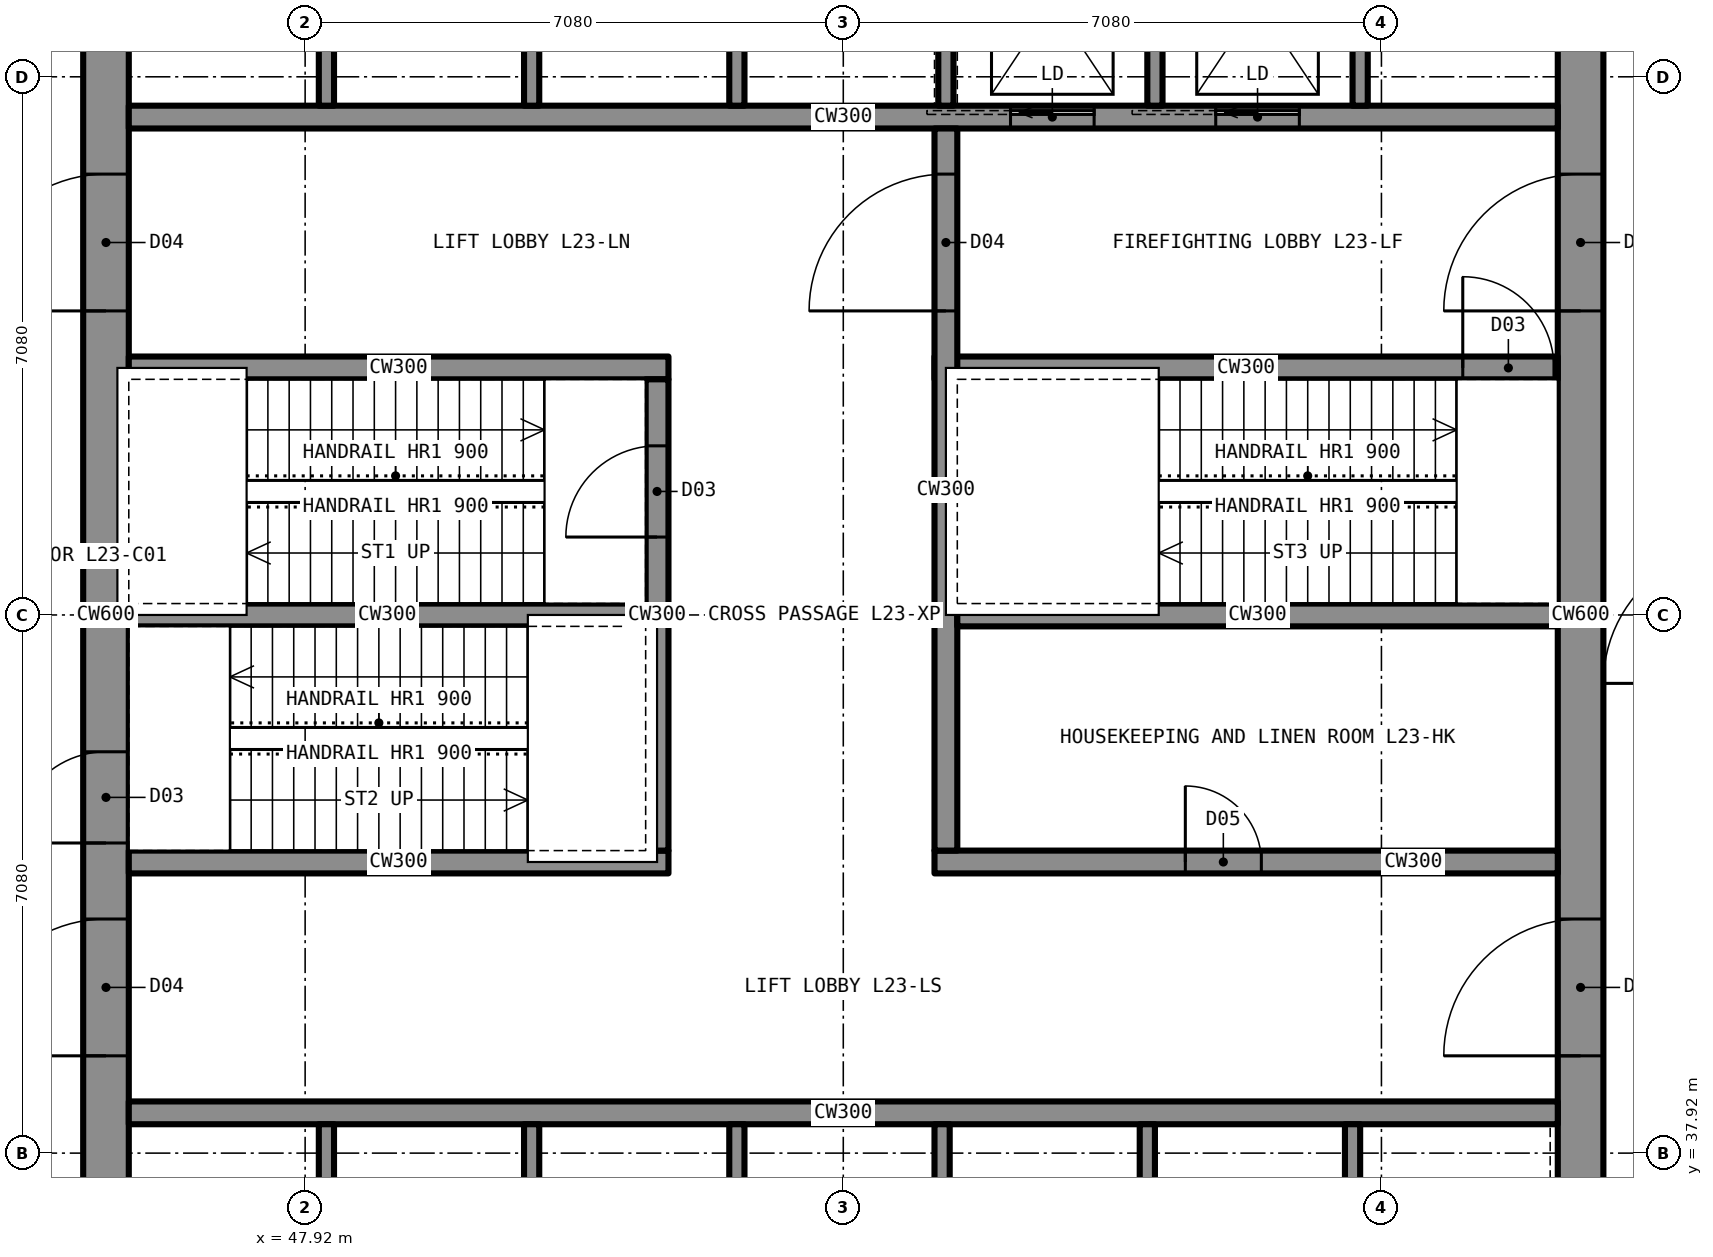
"""IFC4 building model, lengths in metres.
Left out: names, types, materials, properties, quantities, classifications, styles, units other than length and angle.
Written with IfcOpenShell. Run it as: python <this file> out.ifc"""

import sys

from ifc_helpers import new_model, si_unit, direction, frame, frame_2d, origin, place, context, subcontext, project, spatial, rectangle, extrude, element, fill, save


model = new_model("IFC4")
c1 = context("Model", 3, precision=1e-05, world=origin(), true_north=direction((0.0, 1.0)))
c2 = subcontext(c1, "Body", "Model", "MODEL_VIEW")
j1 = project(units=[si_unit("LENGTHUNIT", "METRE"), si_unit("PLANEANGLEUNIT", "RADIAN")], contexts=[c1])
p1 = place(None, origin())
s1 = spatial("IfcSite", under=j1, at=p1, CompositionType="ELEMENT")
p2 = place(p1, origin())
s2 = spatial("IfcBuilding", under=s1, at=p2, CompositionType="ELEMENT")
p3 = place(p2, frame((0.0, 0.0, 88.0)))
s3 = spatial("IfcBuildingStorey", under=s2, at=p3, CompositionType="ELEMENT", Elevation=88.0)
p4 = place(p3, frame((64.7, 35.6, 0.0), z_axis=(0.0, 0.0, 1.0), x_axis=(0.0, 1.0, 0.0)))
e1 = element("IfcWall", 1, at=p4, inside=s3, PredefinedType="SHEAR", context=c2, shape_type="SweptSolid", body=[
    extrude(rectangle(XDim=18.8, YDim=0.6, at=frame_2d((9.4, 0.0))), origin(), (0.0, 0.0, 1.0), 5.4),
])
p5 = place(p4, frame((13.4, 0.0, 0.0)))
e2 = element("IfcOpeningElement", 2, at=p5, cuts=e1, PredefinedType="OPENING", context=c2, shape_type="SweptSolid", body=[
    extrude(rectangle(XDim=1.8, YDim=2.2, at=frame_2d((0.9, 1.1))), frame((0.0, 0.31, 0.0), z_axis=(0.0, -1.0, 0.0), x_axis=(1.0, 0.0, 0.0)), (0.0, 0.0, 1.0), 0.62),
])
p6 = place(p4, frame((3.6, 0.0, 0.0)))
e3 = element("IfcOpeningElement", 3, at=p6, cuts=e1, PredefinedType="OPENING", context=c2, shape_type="SweptSolid", body=[
    extrude(rectangle(XDim=1.8, YDim=2.2, at=frame_2d((0.9, 1.1))), frame((0.0, 0.31, 0.0), z_axis=(0.0, -1.0, 0.0), x_axis=(1.0, 0.0, 0.0)), (0.0, 0.0, 1.0), 0.62),
])
p7 = place(p3, frame((45.3, 35.6, 0.0), z_axis=(0.0, 0.0, 1.0), x_axis=(0.0, 1.0, 0.0)))
e4 = element("IfcWall", 4, at=p7, inside=s3, PredefinedType="SHEAR", context=c2, shape_type="SweptSolid", body=[
    extrude(rectangle(XDim=18.8, YDim=0.6, at=frame_2d((9.4, 0.0))), origin(), (0.0, 0.0, 1.0), 5.4),
])
p8 = place(p7, frame((13.4, 0.0, 0.0)))
e5 = element("IfcOpeningElement", 5, at=p8, cuts=e4, PredefinedType="OPENING", context=c2, shape_type="SweptSolid", body=[
    extrude(rectangle(XDim=1.8, YDim=2.2, at=frame_2d((0.9, 1.1))), frame((0.0, 0.31, 0.0), z_axis=(0.0, -1.0, 0.0), x_axis=(1.0, 0.0, 0.0)), (0.0, 0.0, 1.0), 0.62),
])
p9 = place(p7, frame((3.6, 0.0, 0.0)))
e6 = element("IfcOpeningElement", 6, at=p9, cuts=e4, PredefinedType="OPENING", context=c2, shape_type="SweptSolid", body=[
    extrude(rectangle(XDim=1.8, YDim=2.2, at=frame_2d((0.9, 1.1))), frame((0.0, 0.31, 0.0), z_axis=(0.0, -1.0, 0.0), x_axis=(1.0, 0.0, 0.0)), (0.0, 0.0, 1.0), 0.62),
])
p10 = place(p7, frame((6.4, 0.0, 0.0)))
e7 = element("IfcOpeningElement", 7, at=p10, cuts=e4, PredefinedType="OPENING", context=c2, shape_type="SweptSolid", body=[
    extrude(rectangle(XDim=1.2, YDim=2.2, at=frame_2d((0.6, 1.1))), frame((0.0, 0.31, 0.0), z_axis=(0.0, -1.0, 0.0), x_axis=(1.0, 0.0, 0.0)), (0.0, 0.0, 1.0), 0.62),
])
p11 = place(p3, frame((45.6, 51.55, 0.0), z_axis=(0.0, 0.0, 1.0), x_axis=(1.0, 0.0, 0.0)))
e8 = element("IfcWall", 8, at=p11, inside=s3, PredefinedType="SHEAR", context=c2, shape_type="SweptSolid", body=[
    extrude(rectangle(XDim=18.8, YDim=0.3, at=frame_2d((9.4, 0.0))), origin(), (0.0, 0.0, 1.0), 5.4),
])
p12 = place(p11, frame((11.6, 0.0, 0.0)))
e9 = element("IfcOpeningElement", 9, at=p12, cuts=e8, PredefinedType="OPENING", context=c2, shape_type="SweptSolid", body=[
    extrude(rectangle(XDim=1.1, YDim=2.2, at=frame_2d((0.55, 1.1))), frame((0.0, 0.16, 0.0), z_axis=(0.0, -1.0, 0.0), x_axis=(1.0, 0.0, 0.0)), (0.0, 0.0, 1.0), 0.32),
])
p13 = place(p11, frame((14.3, 0.0, 0.0)))
e10 = element("IfcOpeningElement", 10, at=p13, cuts=e8, PredefinedType="OPENING", context=c2, shape_type="SweptSolid", body=[
    extrude(rectangle(XDim=1.1, YDim=2.2, at=frame_2d((0.55, 1.1))), frame((0.0, 0.16, 0.0), z_axis=(0.0, -1.0, 0.0), x_axis=(1.0, 0.0, 0.0)), (0.0, 0.0, 1.0), 0.32),
])
p14 = place(p3, frame((45.6, 38.45, 0.0), z_axis=(0.0, 0.0, 1.0), x_axis=(1.0, 0.0, 0.0)))
e11 = element("IfcWall", 11, at=p14, inside=s3, PredefinedType="SHEAR", context=c2, shape_type="SweptSolid", body=[
    extrude(rectangle(XDim=18.8, YDim=0.3, at=frame_2d((9.4, 0.0))), origin(), (0.0, 0.0, 1.0), 5.4),
])
p15 = place(p3, frame((45.6, 48.25, 0.0), z_axis=(0.0, 0.0, 1.0), x_axis=(1.0, 0.0, 0.0)))
e12 = element("IfcWall", 12, at=p15, inside=s3, PredefinedType="SHEAR", context=c2, shape_type="SweptSolid", body=[
    extrude(rectangle(XDim=7.1, YDim=0.3, at=frame_2d((3.55, 0.0))), origin(), (0.0, 0.0, 1.0), 5.4),
])
p16 = place(p3, frame((56.2, 48.25, 0.0), z_axis=(0.0, 0.0, 1.0), x_axis=(1.0, 0.0, 0.0)))
e13 = element("IfcWall", 13, at=p16, inside=s3, PredefinedType="SHEAR", context=c2, shape_type="SweptSolid", body=[
    extrude(rectangle(XDim=8.2, YDim=0.3, at=frame_2d((4.1, 0.0))), origin(), (0.0, 0.0, 1.0), 5.4),
])
p17 = place(p16, frame((6.95, 0.0, 0.0)))
e14 = element("IfcOpeningElement", 14, at=p17, cuts=e13, PredefinedType="OPENING", context=c2, shape_type="SweptSolid", body=[
    extrude(rectangle(XDim=1.2, YDim=2.2, at=frame_2d((0.6, 1.1))), frame((0.0, 0.16, 0.0), z_axis=(0.0, -1.0, 0.0), x_axis=(1.0, 0.0, 0.0)), (0.0, 0.0, 1.0), 0.32),
])
p18 = place(p3, frame((45.6, 41.75, 0.0), z_axis=(0.0, 0.0, 1.0), x_axis=(1.0, 0.0, 0.0)))
e15 = element("IfcWall", 15, at=p18, inside=s3, PredefinedType="SHEAR", context=c2, shape_type="SweptSolid", body=[
    extrude(rectangle(XDim=7.1, YDim=0.3, at=frame_2d((3.55, 0.0))), origin(), (0.0, 0.0, 1.0), 5.4),
])
p19 = place(p3, frame((56.2, 41.75, 0.0), z_axis=(0.0, 0.0, 1.0), x_axis=(1.0, 0.0, 0.0)))
e16 = element("IfcWall", 16, at=p19, inside=s3, PredefinedType="SHEAR", context=c2, shape_type="SweptSolid", body=[
    extrude(rectangle(XDim=8.2, YDim=0.3, at=frame_2d((4.1, 0.0))), origin(), (0.0, 0.0, 1.0), 5.4),
])
p20 = place(p19, frame((3.3, 0.0, 0.0)))
e17 = element("IfcOpeningElement", 17, at=p20, cuts=e16, PredefinedType="OPENING", context=c2, shape_type="SweptSolid", body=[
    extrude(rectangle(XDim=1.0, YDim=2.1, at=frame_2d((0.5, 1.05))), frame((0.0, 0.16, 0.0), z_axis=(0.0, -1.0, 0.0), x_axis=(1.0, 0.0, 0.0)), (0.0, 0.0, 1.0), 0.32),
])
p21 = place(p3, frame((52.55, 41.9, 0.0), z_axis=(0.0, 0.0, 1.0), x_axis=(0.0, 1.0, 0.0)))
e18 = element("IfcWall", 18, at=p21, inside=s3, PredefinedType="SHEAR", context=c2, shape_type="SweptSolid", body=[
    extrude(rectangle(XDim=6.2, YDim=0.3, at=frame_2d((3.1, 0.0))), origin(), (0.0, 0.0, 1.0), 5.4),
])
p22 = place(p21, frame((4.125, 0.0, 0.0)))
e19 = element("IfcOpeningElement", 19, at=p22, cuts=e18, PredefinedType="OPENING", context=c2, shape_type="SweptSolid", body=[
    extrude(rectangle(XDim=1.2, YDim=2.2, at=frame_2d((0.6, 1.1))), frame((0.0, 0.16, 0.0), z_axis=(0.0, -1.0, 0.0), x_axis=(1.0, 0.0, 0.0)), (0.0, 0.0, 1.0), 0.32),
])
p23 = place(p3, frame((56.35, 41.9, 0.0), z_axis=(0.0, 0.0, 1.0), x_axis=(0.0, 1.0, 0.0)))
e20 = element("IfcWall", 20, at=p23, inside=s3, PredefinedType="SHEAR", context=c2, shape_type="SweptSolid", body=[
    extrude(rectangle(XDim=9.5, YDim=0.3, at=frame_2d((4.75, 0.0))), origin(), (0.0, 0.0, 1.0), 5.4),
])
p24 = place(p23, frame((7.1, 0.0, 0.0)))
e21 = element("IfcOpeningElement", 21, at=p24, cuts=e20, PredefinedType="OPENING", context=c2, shape_type="SweptSolid", body=[
    extrude(rectangle(XDim=1.8, YDim=2.2, at=frame_2d((0.9, 1.1))), frame((0.0, 0.16, 0.0), z_axis=(0.0, -1.0, 0.0), x_axis=(1.0, 0.0, 0.0)), (0.0, 0.0, 1.0), 0.32),
])
p25 = place(p3, frame((45.6, 45.0, 0.0), z_axis=(0.0, 0.0, 1.0), x_axis=(1.0, 0.0, 0.0)))
e22 = element("IfcWall", 22, at=p25, inside=s3, PredefinedType="SHEAR", context=c2, shape_type="SweptSolid", body=[
    extrude(rectangle(XDim=6.8, YDim=0.3, at=frame_2d((3.4, 0.0))), origin(), (0.0, 0.0, 1.0), 5.4),
])
p26 = place(p3, frame((56.5, 45.0, 0.0), z_axis=(0.0, 0.0, 1.0), x_axis=(1.0, 0.0, 0.0)))
e23 = element("IfcWall", 23, at=p26, inside=s3, PredefinedType="SHEAR", context=c2, shape_type="SweptSolid", body=[
    extrude(rectangle(XDim=7.9, YDim=0.3, at=frame_2d((3.95, 0.0))), origin(), (0.0, 0.0, 1.0), 5.4),
])
for number, where, z_axis, x_axis in (
    (24, (48.2, 51.7, 0.0), (0.0, 0.0, 1.0), (0.0, 1.0, 0.0)),
    (25, (50.9, 51.7, 0.0), (0.0, 0.0, 1.0), (0.0, 1.0, 0.0)),
    (26, (53.6, 51.7, 0.0), (0.0, 0.0, 1.0), (0.0, 1.0, 0.0)),
    (27, (59.1, 51.7, 0.0), (0.0, 0.0, 1.0), (0.0, 1.0, 0.0)),
    (28, (61.8, 51.7, 0.0), (0.0, 0.0, 1.0), (0.0, 1.0, 0.0)),
    (29, (56.35, 51.7, 0.0), (0.0, 0.0, 1.0), (0.0, 1.0, 0.0)),
    (30, (48.2, 35.6, 0.0), (0.0, 0.0, 1.0), (0.0, 1.0, 0.0)),
    (31, (50.9, 35.6, 0.0), (0.0, 0.0, 1.0), (0.0, 1.0, 0.0)),
    (32, (53.6, 35.6, 0.0), (0.0, 0.0, 1.0), (0.0, 1.0, 0.0)),
    (33, (56.3, 35.6, 0.0), (0.0, 0.0, 1.0), (0.0, 1.0, 0.0)),
    (34, (59.0, 35.6, 0.0), (0.0, 0.0, 1.0), (0.0, 1.0, 0.0)),
    (35, (61.7, 35.6, 0.0), (0.0, 0.0, 1.0), (0.0, 1.0, 0.0)),
):
    element("IfcWall", number, at=place(p3, frame(where, z_axis=z_axis, x_axis=x_axis)), inside=s3, PredefinedType="PARTITIONING", context=c2, shape_type="SweptSolid", body=[
        extrude(rectangle(XDim=2.7, YDim=0.2, at=frame_2d((1.35, 0.0))), origin(), (0.0, 0.0, 1.0), 5.23),
    ])
p27 = place(p8, origin())
e36 = element("IfcDoor", 36, at=p27, inside=s3, OperationType="DOUBLE_DOOR_SINGLE_SWING", PredefinedType="DOOR", context=c2, shape_type="SweptSolid", body=[
    extrude(rectangle(XDim=1.8, YDim=2.2, at=frame_2d((0.9, 1.1))), frame((0.0, 0.025, 0.0), z_axis=(0.0, -1.0, 0.0), x_axis=(1.0, 0.0, 0.0)), (0.0, 0.0, 1.0), 0.05),
])
fill(e5, e36)
p28 = place(p9, origin())
e37 = element("IfcDoor", 37, at=p28, inside=s3, OperationType="DOUBLE_DOOR_SINGLE_SWING", PredefinedType="DOOR", context=c2, shape_type="SweptSolid", body=[
    extrude(rectangle(XDim=1.8, YDim=2.2, at=frame_2d((0.9, 1.1))), frame((0.0, 0.025, 0.0), z_axis=(0.0, -1.0, 0.0), x_axis=(1.0, 0.0, 0.0)), (0.0, 0.0, 1.0), 0.05),
])
fill(e6, e37)
p29 = place(p5, origin())
e38 = element("IfcDoor", 38, at=p29, inside=s3, OperationType="DOUBLE_DOOR_SINGLE_SWING", PredefinedType="DOOR", context=c2, shape_type="SweptSolid", body=[
    extrude(rectangle(XDim=1.8, YDim=2.2, at=frame_2d((0.9, 1.1))), frame((0.0, 0.025, 0.0), z_axis=(0.0, -1.0, 0.0), x_axis=(1.0, 0.0, 0.0)), (0.0, 0.0, 1.0), 0.05),
])
fill(e2, e38)
p30 = place(p6, origin())
e39 = element("IfcDoor", 39, at=p30, inside=s3, OperationType="DOUBLE_DOOR_SINGLE_SWING", PredefinedType="DOOR", context=c2, shape_type="SweptSolid", body=[
    extrude(rectangle(XDim=1.8, YDim=2.2, at=frame_2d((0.9, 1.1))), frame((0.0, 0.025, 0.0), z_axis=(0.0, -1.0, 0.0), x_axis=(1.0, 0.0, 0.0)), (0.0, 0.0, 1.0), 0.05),
])
fill(e3, e39)
p31 = place(p24, origin())
e40 = element("IfcDoor", 40, at=p31, inside=s3, OperationType="DOUBLE_DOOR_SINGLE_SWING", PredefinedType="DOOR", context=c2, shape_type="SweptSolid", body=[
    extrude(rectangle(XDim=1.8, YDim=2.2, at=frame_2d((0.9, 1.1))), frame((0.0, 0.025, 0.0), z_axis=(0.0, -1.0, 0.0), x_axis=(1.0, 0.0, 0.0)), (0.0, 0.0, 1.0), 0.05),
])
fill(e21, e40)
p32 = place(p22, origin())
e41 = element("IfcDoor", 41, at=p32, inside=s3, OperationType="SINGLE_SWING_LEFT", PredefinedType="DOOR", context=c2, shape_type="SweptSolid", body=[
    extrude(rectangle(XDim=1.2, YDim=2.2, at=frame_2d((0.6, 1.1))), frame((0.0, 0.025, 0.0), z_axis=(0.0, -1.0, 0.0), x_axis=(1.0, 0.0, 0.0)), (0.0, 0.0, 1.0), 0.05),
])
fill(e19, e41)
p33 = place(p10, origin())
e42 = element("IfcDoor", 42, at=p33, inside=s3, OperationType="SINGLE_SWING_LEFT", PredefinedType="DOOR", context=c2, shape_type="SweptSolid", body=[
    extrude(rectangle(XDim=1.2, YDim=2.2, at=frame_2d((0.6, 1.1))), frame((0.0, 0.025, 0.0), z_axis=(0.0, -1.0, 0.0), x_axis=(1.0, 0.0, 0.0)), (0.0, 0.0, 1.0), 0.05),
])
fill(e7, e42)
p34 = place(p17, origin())
e43 = element("IfcDoor", 43, at=p34, inside=s3, OperationType="SINGLE_SWING_LEFT", PredefinedType="DOOR", context=c2, shape_type="SweptSolid", body=[
    extrude(rectangle(XDim=1.2, YDim=2.2, at=frame_2d((0.6, 1.1))), frame((0.0, 0.025, 0.0), z_axis=(0.0, -1.0, 0.0), x_axis=(1.0, 0.0, 0.0)), (0.0, 0.0, 1.0), 0.05),
])
fill(e14, e43)
p35 = place(p20, origin())
e44 = element("IfcDoor", 44, at=p35, inside=s3, OperationType="SINGLE_SWING_LEFT", PredefinedType="DOOR", context=c2, shape_type="SweptSolid", body=[
    extrude(rectangle(XDim=1.0, YDim=2.1, at=frame_2d((0.5, 1.05))), frame((0.0, 0.025, 0.0), z_axis=(0.0, -1.0, 0.0), x_axis=(1.0, 0.0, 0.0)), (0.0, 0.0, 1.0), 0.05),
])
fill(e17, e44)
p36 = place(p12, origin())
e45 = element("IfcDoor", 45, at=p36, inside=s3, OperationType="SLIDING_TO_LEFT", PredefinedType="DOOR", context=c2, shape_type="SweptSolid", body=[
    extrude(rectangle(XDim=1.1, YDim=2.2, at=frame_2d((0.55, 1.1))), frame((0.0, 0.025, 0.0), z_axis=(0.0, -1.0, 0.0), x_axis=(1.0, 0.0, 0.0)), (0.0, 0.0, 1.0), 0.05),
])
fill(e9, e45)
p37 = place(p13, origin())
e46 = element("IfcDoor", 46, at=p37, inside=s3, OperationType="SLIDING_TO_LEFT", PredefinedType="DOOR", context=c2, shape_type="SweptSolid", body=[
    extrude(rectangle(XDim=1.1, YDim=2.2, at=frame_2d((0.55, 1.1))), frame((0.0, 0.025, 0.0), z_axis=(0.0, -1.0, 0.0), x_axis=(1.0, 0.0, 0.0)), (0.0, 0.0, 1.0), 0.05),
])
fill(e10, e46)
save(model, sys.argv[1])
